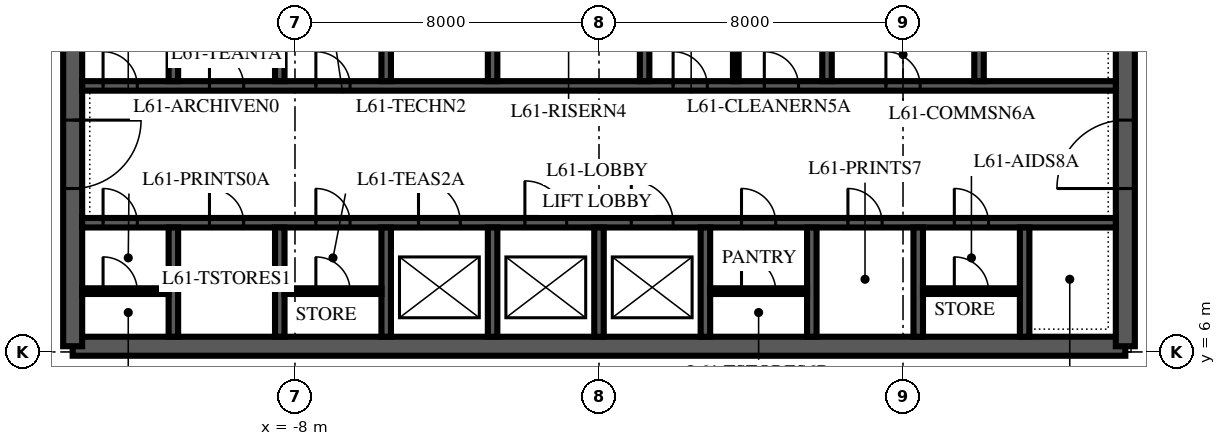
"""IFC4 building model, lengths in metres.
Left out: names, types, materials, properties, quantities, classifications, styles, units other than length and angle.
Written with IfcOpenShell. Run it as: python <this file> out.ifc"""

import sys

from ifc_helpers import new_model, si_unit, direction, frame, frame_2d, origin, place, context, subcontext, project, spatial, polyline, rectangle, outline, extrude, element, fill, save


model = new_model("IFC4")
c1 = context("Model", 3, precision=1e-05, world=origin(), true_north=direction((0.0, 1.0)))
c2 = subcontext(c1, "Body", "Model", "MODEL_VIEW")
j1 = project(units=[si_unit("LENGTHUNIT", "METRE"), si_unit("PLANEANGLEUNIT", "RADIAN")], contexts=[c1])
p1 = place(None, origin())
s1 = spatial("IfcSite", under=j1, at=p1, CompositionType="ELEMENT")
p2 = place(p1, origin())
s2 = spatial("IfcBuilding", under=s1, at=p2, CompositionType="ELEMENT")
p3 = place(p2, frame((0.0, 0.0, 264.0)))
s3 = spatial("IfcBuildingStorey", under=s2, at=p3, CompositionType="ELEMENT", Elevation=264.0)
p4 = place(p3, frame((-13.85, 6.15, 0.0), z_axis=(0.0, 0.0, 1.0), x_axis=(1.0, 0.0, 0.0)))
e1 = element("IfcWall", 1, at=p4, inside=s3, PredefinedType="SHEAR", context=c2, shape_type="SweptSolid", body=[
    extrude(rectangle(XDim=27.7, YDim=0.5, at=frame_2d((13.85, 0.0))), origin(), (0.0, 0.0, 1.0), 4.0),
])
p5 = place(p3, frame((13.85, 6.15, 0.0), z_axis=(0.0, 0.0, 1.0), x_axis=(0.0, 1.0, 0.0)))
e2 = element("IfcWall", 2, at=p5, inside=s3, PredefinedType="SHEAR", context=c2, shape_type="SweptSolid", body=[
    extrude(outline(polyline([(0.0, -0.25), (17.7, -0.25), (17.7, 0.0), (17.45, 0.0), (17.45, 0.25), (0.25, 0.25), (0.25, 0.0), (0.0, 0.0), (0.0, -0.25)])), origin(), (0.0, 0.0, 1.0), 4.0),
])
p6 = place(p5, frame((4.15, 0.0, 0.0)))
e3 = element("IfcOpeningElement", 3, at=p6, cuts=e2, PredefinedType="OPENING", context=c2, shape_type="SweptSolid", body=[
    extrude(rectangle(XDim=1.8, YDim=2.4, at=frame_2d((0.9, 1.2))), frame((0.0, 0.265, 0.0), z_axis=(0.0, -1.0, 0.0), x_axis=(1.0, 0.0, 0.0)), (0.0, 0.0, 1.0), 0.53),
])
p7 = place(p3, frame((-13.85, 23.85, 0.0), z_axis=(0.0, 0.0, 1.0), x_axis=(0.0, -1.0, 0.0)))
e4 = element("IfcWall", 4, at=p7, inside=s3, PredefinedType="SHEAR", context=c2, shape_type="SweptSolid", body=[
    extrude(outline(polyline([(0.0, -0.25), (17.7, -0.25), (17.7, 0.0), (17.45, 0.0), (17.45, 0.25), (0.25, 0.25), (0.25, 0.0), (0.0, 0.0), (0.0, -0.25)])), origin(), (0.0, 0.0, 1.0), 4.0),
])
p8 = place(p7, frame((11.75, 0.0, 0.0)))
e5 = element("IfcOpeningElement", 5, at=p8, cuts=e4, PredefinedType="OPENING", context=c2, shape_type="SweptSolid", body=[
    extrude(rectangle(XDim=1.8, YDim=2.4, at=frame_2d((0.9, 1.2))), frame((0.0, 0.265, 0.0), z_axis=(0.0, -1.0, 0.0), x_axis=(1.0, 0.0, 0.0)), (0.0, 0.0, 1.0), 0.53),
])
p9 = place(p3, frame((-13.6, 9.4, 0.0), z_axis=(0.0, 0.0, 1.0), x_axis=(1.0, 0.0, 0.0)))
e6 = element("IfcWall", 6, at=p9, inside=s3, PredefinedType="SHEAR", context=c2, shape_type="SweptSolid", body=[
    extrude(rectangle(XDim=27.2, YDim=0.25, at=frame_2d((13.6, 0.0))), origin(), (0.0, 0.0, 1.0), 4.0),
])
p10 = place(p9, frame((8.85, 0.0, 0.0)))
e7 = element("IfcOpeningElement", 7, at=p10, cuts=e6, PredefinedType="OPENING", context=c2, shape_type="SweptSolid", body=[
    extrude(rectangle(XDim=1.1, YDim=2.1, at=frame_2d((0.55, 1.05))), frame((0.0, 0.14, 0.0), z_axis=(0.0, -1.0, 0.0), x_axis=(1.0, 0.0, 0.0)), (0.0, 0.0, 1.0), 0.28),
])
p11 = place(p9, frame((11.65, 0.0, 0.0)))
e8 = element("IfcOpeningElement", 8, at=p11, cuts=e6, PredefinedType="OPENING", context=c2, shape_type="SweptSolid", body=[
    extrude(rectangle(XDim=1.1, YDim=2.1, at=frame_2d((0.55, 1.05))), frame((0.0, 0.14, 0.0), z_axis=(0.0, -1.0, 0.0), x_axis=(1.0, 0.0, 0.0)), (0.0, 0.0, 1.0), 0.28),
])
p12 = place(p9, frame((14.45, 0.0, 0.0)))
e9 = element("IfcOpeningElement", 9, at=p12, cuts=e6, PredefinedType="OPENING", context=c2, shape_type="SweptSolid", body=[
    extrude(rectangle(XDim=1.1, YDim=2.1, at=frame_2d((0.55, 1.05))), frame((0.0, 0.14, 0.0), z_axis=(0.0, -1.0, 0.0), x_axis=(1.0, 0.0, 0.0)), (0.0, 0.0, 1.0), 0.28),
])
p13 = place(p9, frame((0.55, 0.0, 0.0)))
e10 = element("IfcOpeningElement", 10, at=p13, cuts=e6, PredefinedType="OPENING", context=c2, shape_type="SweptSolid", body=[
    extrude(rectangle(XDim=0.9, YDim=2.1, at=frame_2d((0.45, 1.05))), frame((0.0, 0.14, 0.0), z_axis=(0.0, -1.0, 0.0), x_axis=(1.0, 0.0, 0.0)), (0.0, 0.0, 1.0), 0.28),
])
p14 = place(p9, frame((3.35, 0.0, 0.0)))
e11 = element("IfcOpeningElement", 11, at=p14, cuts=e6, PredefinedType="OPENING", context=c2, shape_type="SweptSolid", body=[
    extrude(rectangle(XDim=0.9, YDim=2.1, at=frame_2d((0.45, 1.05))), frame((0.0, 0.14, 0.0), z_axis=(0.0, -1.0, 0.0), x_axis=(1.0, 0.0, 0.0)), (0.0, 0.0, 1.0), 0.28),
])
p15 = place(p9, frame((6.15, 0.0, 0.0)))
e12 = element("IfcOpeningElement", 12, at=p15, cuts=e6, PredefinedType="OPENING", context=c2, shape_type="SweptSolid", body=[
    extrude(rectangle(XDim=0.9, YDim=2.1, at=frame_2d((0.45, 1.05))), frame((0.0, 0.14, 0.0), z_axis=(0.0, -1.0, 0.0), x_axis=(1.0, 0.0, 0.0)), (0.0, 0.0, 1.0), 0.28),
])
p16 = place(p9, frame((17.35, 0.0, 0.0)))
e13 = element("IfcOpeningElement", 13, at=p16, cuts=e6, PredefinedType="OPENING", context=c2, shape_type="SweptSolid", body=[
    extrude(rectangle(XDim=0.9, YDim=2.1, at=frame_2d((0.45, 1.05))), frame((0.0, 0.14, 0.0), z_axis=(0.0, -1.0, 0.0), x_axis=(1.0, 0.0, 0.0)), (0.0, 0.0, 1.0), 0.28),
])
p17 = place(p9, frame((20.15, 0.0, 0.0)))
e14 = element("IfcOpeningElement", 14, at=p17, cuts=e6, PredefinedType="OPENING", context=c2, shape_type="SweptSolid", body=[
    extrude(rectangle(XDim=0.9, YDim=2.1, at=frame_2d((0.45, 1.05))), frame((0.0, 0.14, 0.0), z_axis=(0.0, -1.0, 0.0), x_axis=(1.0, 0.0, 0.0)), (0.0, 0.0, 1.0), 0.28),
])
p18 = place(p9, frame((22.95, 0.0, 0.0)))
e15 = element("IfcOpeningElement", 15, at=p18, cuts=e6, PredefinedType="OPENING", context=c2, shape_type="SweptSolid", body=[
    extrude(rectangle(XDim=0.9, YDim=2.1, at=frame_2d((0.45, 1.05))), frame((0.0, 0.14, 0.0), z_axis=(0.0, -1.0, 0.0), x_axis=(1.0, 0.0, 0.0)), (0.0, 0.0, 1.0), 0.28),
])
p19 = place(p3, frame((-13.6, 13.0, 0.0), z_axis=(0.0, 0.0, 1.0), x_axis=(1.0, 0.0, 0.0)))
e16 = element("IfcWall", 16, at=p19, inside=s3, PredefinedType="SHEAR", context=c2, shape_type="SweptSolid", body=[
    extrude(rectangle(XDim=27.2, YDim=0.25, at=frame_2d((13.6, 0.0))), origin(), (0.0, 0.0, 1.0), 4.0),
])
p20 = place(p19, frame((15.55, 0.0, 0.0)))
e17 = element("IfcOpeningElement", 17, at=p20, cuts=e16, PredefinedType="OPENING", context=c2, shape_type="SweptSolid", body=[
    extrude(rectangle(XDim=0.9, YDim=2.1, at=frame_2d((0.45, 1.05))), frame((0.0, 0.14, 0.0), z_axis=(0.0, -1.0, 0.0), x_axis=(1.0, 0.0, 0.0)), (0.0, 0.0, 1.0), 0.28),
])
p21 = place(p19, frame((17.95, 0.0, 0.0)))
e18 = element("IfcOpeningElement", 18, at=p21, cuts=e16, PredefinedType="OPENING", context=c2, shape_type="SweptSolid", body=[
    extrude(rectangle(XDim=0.9, YDim=2.1, at=frame_2d((0.45, 1.05))), frame((0.0, 0.14, 0.0), z_axis=(0.0, -1.0, 0.0), x_axis=(1.0, 0.0, 0.0)), (0.0, 0.0, 1.0), 0.28),
])
p22 = place(p19, frame((21.15, 0.0, 0.0)))
e19 = element("IfcOpeningElement", 19, at=p22, cuts=e16, PredefinedType="OPENING", context=c2, shape_type="SweptSolid", body=[
    extrude(rectangle(XDim=0.9, YDim=2.1, at=frame_2d((0.45, 1.05))), frame((0.0, 0.14, 0.0), z_axis=(0.0, -1.0, 0.0), x_axis=(1.0, 0.0, 0.0)), (0.0, 0.0, 1.0), 0.28),
])
p23 = place(p19, frame((0.55, 0.0, 0.0)))
e20 = element("IfcOpeningElement", 20, at=p23, cuts=e16, PredefinedType="OPENING", context=c2, shape_type="SweptSolid", body=[
    extrude(rectangle(XDim=0.9, YDim=2.1, at=frame_2d((0.45, 1.05))), frame((0.0, 0.14, 0.0), z_axis=(0.0, -1.0, 0.0), x_axis=(1.0, 0.0, 0.0)), (0.0, 0.0, 1.0), 0.28),
])
p24 = place(p19, frame((3.35, 0.0, 0.0)))
e21 = element("IfcOpeningElement", 21, at=p24, cuts=e16, PredefinedType="OPENING", context=c2, shape_type="SweptSolid", body=[
    extrude(rectangle(XDim=0.9, YDim=2.1, at=frame_2d((0.45, 1.05))), frame((0.0, 0.14, 0.0), z_axis=(0.0, -1.0, 0.0), x_axis=(1.0, 0.0, 0.0)), (0.0, 0.0, 1.0), 0.28),
])
p25 = place(p19, frame((6.15, 0.0, 0.0)))
e22 = element("IfcOpeningElement", 22, at=p25, cuts=e16, PredefinedType="OPENING", context=c2, shape_type="SweptSolid", body=[
    extrude(rectangle(XDim=0.9, YDim=2.1, at=frame_2d((0.45, 1.05))), frame((0.0, 0.14, 0.0), z_axis=(0.0, -1.0, 0.0), x_axis=(1.0, 0.0, 0.0)), (0.0, 0.0, 1.0), 0.28),
])
for number, where, z_axis, x_axis in (
    (23, (-11.2, 6.4, 0.0), (0.0, 0.0, 1.0), (0.0, 1.0, 0.0)),
    (24, (-8.4, 6.4, 0.0), (0.0, 0.0, 1.0), (0.0, 1.0, 0.0)),
    (25, (-5.6, 6.4, 0.0), (0.0, 0.0, 1.0), (0.0, 1.0, 0.0)),
    (26, (-2.8, 6.4, 0.0), (0.0, 0.0, 1.0), (0.0, 1.0, 0.0)),
    (27, (0.0, 6.4, 0.0), (0.0, 0.0, 1.0), (0.0, 1.0, 0.0)),
    (28, (2.8, 6.4, 0.0), (0.0, 0.0, 1.0), (0.0, 1.0, 0.0)),
    (29, (5.6, 6.4, 0.0), (0.0, 0.0, 1.0), (0.0, 1.0, 0.0)),
    (30, (8.4, 6.4, 0.0), (0.0, 0.0, 1.0), (0.0, 1.0, 0.0)),
    (31, (11.2, 6.4, 0.0), (0.0, 0.0, 1.0), (0.0, 1.0, 0.0)),
):
    element("IfcWall", number, at=place(p3, frame(where, z_axis=z_axis, x_axis=x_axis)), inside=s3, PredefinedType="SHEAR", context=c2, shape_type="SweptSolid", body=[
        extrude(rectangle(XDim=2.875, YDim=0.25, at=frame_2d((1.438, 0.0))), origin(), (0.0, 0.0, 1.0), 4.0),
    ])
for number, where, z_axis, x_axis in (
    (32, (-11.2, 13.125, 0.0), (0.0, 0.0, 1.0), (0.0, 1.0, 0.0)),
    (33, (-8.4, 13.125, 0.0), (0.0, 0.0, 1.0), (0.0, 1.0, 0.0)),
    (34, (-5.6, 13.125, 0.0), (0.0, 0.0, 1.0), (0.0, 1.0, 0.0)),
    (35, (-2.8, 13.125, 0.0), (0.0, 0.0, 1.0), (0.0, 1.0, 0.0)),
    (36, (1.2, 13.125, 0.0), (0.0, 0.0, 1.0), (0.0, 1.0, 0.0)),
    (37, (6.0, 13.125, 0.0), (0.0, 0.0, 1.0), (0.0, 1.0, 0.0)),
    (38, (10.0, 13.125, 0.0), (0.0, 0.0, 1.0), (0.0, 1.0, 0.0)),
):
    element("IfcWall", number, at=place(p3, frame(where, z_axis=z_axis, x_axis=x_axis)), inside=s3, PredefinedType="SHEAR", context=c2, shape_type="SweptSolid", body=[
        extrude(rectangle(XDim=2.75, YDim=0.25, at=frame_2d((1.375, 0.0))), origin(), (0.0, 0.0, 1.0), 4.0),
    ])
p26 = place(p3, frame((3.6, 13.125, 0.0), z_axis=(0.0, 0.0, 1.0), x_axis=(0.0, 1.0, 0.0)))
e39 = element("IfcWall", 39, at=p26, inside=s3, PredefinedType="PARTITIONING", context=c2, shape_type="SweptSolid", body=[
    extrude(rectangle(XDim=2.75, YDim=0.15, at=frame_2d((1.375, 0.0))), origin(), (0.0, 0.0, 1.0), 3.85),
])
p27 = place(p3, frame((-13.6, 7.6, 0.0), z_axis=(0.0, 0.0, 1.0), x_axis=(1.0, 0.0, 0.0)))
e40 = element("IfcWall", 40, at=p27, inside=s3, PredefinedType="PARTITIONING", context=c2, shape_type="SweptSolid", body=[
    extrude(rectangle(XDim=2.275, YDim=0.15, at=frame_2d((1.138, 0.0))), origin(), (0.0, 0.0, 1.0), 3.85),
])
p28 = place(p27, frame((0.55, 0.0, 0.0)))
e41 = element("IfcOpeningElement", 41, at=p28, cuts=e40, PredefinedType="OPENING", context=c2, shape_type="SweptSolid", body=[
    extrude(rectangle(XDim=0.9, YDim=2.1, at=frame_2d((0.45, 1.05))), frame((0.0, 0.09, 0.0), z_axis=(0.0, -1.0, 0.0), x_axis=(1.0, 0.0, 0.0)), (0.0, 0.0, 1.0), 0.18),
])
p29 = place(p3, frame((-8.275, 7.6, 0.0), z_axis=(0.0, 0.0, 1.0), x_axis=(1.0, 0.0, 0.0)))
e42 = element("IfcWall", 42, at=p29, inside=s3, PredefinedType="PARTITIONING", context=c2, shape_type="SweptSolid", body=[
    extrude(rectangle(XDim=2.55, YDim=0.15, at=frame_2d((1.275, 0.0))), origin(), (0.0, 0.0, 1.0), 3.85),
])
p30 = place(p29, frame((0.825, 0.0, 0.0)))
e43 = element("IfcOpeningElement", 43, at=p30, cuts=e42, PredefinedType="OPENING", context=c2, shape_type="SweptSolid", body=[
    extrude(rectangle(XDim=0.9, YDim=2.1, at=frame_2d((0.45, 1.05))), frame((0.0, 0.09, 0.0), z_axis=(0.0, -1.0, 0.0), x_axis=(1.0, 0.0, 0.0)), (0.0, 0.0, 1.0), 0.18),
])
p31 = place(p3, frame((2.925, 7.6, 0.0), z_axis=(0.0, 0.0, 1.0), x_axis=(1.0, 0.0, 0.0)))
e44 = element("IfcWall", 44, at=p31, inside=s3, PredefinedType="PARTITIONING", context=c2, shape_type="SweptSolid", body=[
    extrude(rectangle(XDim=2.55, YDim=0.15, at=frame_2d((1.275, 0.0))), origin(), (0.0, 0.0, 1.0), 3.85),
])
p32 = place(p31, frame((0.825, 0.0, 0.0)))
e45 = element("IfcOpeningElement", 45, at=p32, cuts=e44, PredefinedType="OPENING", context=c2, shape_type="SweptSolid", body=[
    extrude(rectangle(XDim=0.9, YDim=2.1, at=frame_2d((0.45, 1.05))), frame((0.0, 0.09, 0.0), z_axis=(0.0, -1.0, 0.0), x_axis=(1.0, 0.0, 0.0)), (0.0, 0.0, 1.0), 0.18),
])
p33 = place(p3, frame((8.525, 7.6, 0.0), z_axis=(0.0, 0.0, 1.0), x_axis=(1.0, 0.0, 0.0)))
e46 = element("IfcWall", 46, at=p33, inside=s3, PredefinedType="PARTITIONING", context=c2, shape_type="SweptSolid", body=[
    extrude(rectangle(XDim=2.55, YDim=0.15, at=frame_2d((1.275, 0.0))), origin(), (0.0, 0.0, 1.0), 3.85),
])
p34 = place(p33, frame((0.825, 0.0, 0.0)))
e47 = element("IfcOpeningElement", 47, at=p34, cuts=e46, PredefinedType="OPENING", context=c2, shape_type="SweptSolid", body=[
    extrude(rectangle(XDim=0.9, YDim=2.1, at=frame_2d((0.45, 1.05))), frame((0.0, 0.09, 0.0), z_axis=(0.0, -1.0, 0.0), x_axis=(1.0, 0.0, 0.0)), (0.0, 0.0, 1.0), 0.18),
])
p35 = place(p6, origin())
e48 = element("IfcDoor", 48, at=p35, inside=s3, OperationType="DOUBLE_DOOR_SINGLE_SWING", PredefinedType="DOOR", context=c2, shape_type="SweptSolid", body=[
    extrude(rectangle(XDim=1.8, YDim=2.4, at=frame_2d((0.9, 1.2))), frame((0.0, 0.25, 0.0), z_axis=(0.0, -1.0, 0.0), x_axis=(1.0, 0.0, 0.0)), (0.0, 0.0, 1.0), 0.5),
])
fill(e3, e48)
p36 = place(p8, origin())
e49 = element("IfcDoor", 49, at=p36, inside=s3, OperationType="DOUBLE_DOOR_SINGLE_SWING", PredefinedType="DOOR", context=c2, shape_type="SweptSolid", body=[
    extrude(rectangle(XDim=1.8, YDim=2.4, at=frame_2d((0.9, 1.2))), frame((0.0, 0.25, 0.0), z_axis=(0.0, -1.0, 0.0), x_axis=(1.0, 0.0, 0.0)), (0.0, 0.0, 1.0), 0.5),
])
fill(e5, e49)
p37 = place(p10, origin())
e50 = element("IfcDoor", 50, at=p37, inside=s3, OperationType="SLIDING_TO_LEFT", PredefinedType="DOOR", context=c2, shape_type="SweptSolid", body=[
    extrude(rectangle(XDim=1.1, YDim=2.1, at=frame_2d((0.55, 1.05))), frame((0.0, 0.125, 0.0), z_axis=(0.0, -1.0, 0.0), x_axis=(1.0, 0.0, 0.0)), (0.0, 0.0, 1.0), 0.25),
])
fill(e7, e50)
p38 = place(p11, origin())
e51 = element("IfcDoor", 51, at=p38, inside=s3, OperationType="SLIDING_TO_LEFT", PredefinedType="DOOR", context=c2, shape_type="SweptSolid", body=[
    extrude(rectangle(XDim=1.1, YDim=2.1, at=frame_2d((0.55, 1.05))), frame((0.0, 0.125, 0.0), z_axis=(0.0, -1.0, 0.0), x_axis=(1.0, 0.0, 0.0)), (0.0, 0.0, 1.0), 0.25),
])
fill(e8, e51)
p39 = place(p12, origin())
e52 = element("IfcDoor", 52, at=p39, inside=s3, OperationType="SLIDING_TO_LEFT", PredefinedType="DOOR", context=c2, shape_type="SweptSolid", body=[
    extrude(rectangle(XDim=1.1, YDim=2.1, at=frame_2d((0.55, 1.05))), frame((0.0, 0.125, 0.0), z_axis=(0.0, -1.0, 0.0), x_axis=(1.0, 0.0, 0.0)), (0.0, 0.0, 1.0), 0.25),
])
fill(e9, e52)
p40 = place(p20, origin())
e53 = element("IfcDoor", 53, at=p40, inside=s3, OperationType="SINGLE_SWING_LEFT", PredefinedType="DOOR", context=c2, shape_type="SweptSolid", body=[
    extrude(rectangle(XDim=0.9, YDim=2.1, at=frame_2d((0.45, 1.05))), frame((0.0, 0.125, 0.0), z_axis=(0.0, -1.0, 0.0), x_axis=(1.0, 0.0, 0.0)), (0.0, 0.0, 1.0), 0.25),
])
fill(e17, e53)
p41 = place(p21, origin())
e54 = element("IfcDoor", 54, at=p41, inside=s3, OperationType="SINGLE_SWING_LEFT", PredefinedType="DOOR", context=c2, shape_type="SweptSolid", body=[
    extrude(rectangle(XDim=0.9, YDim=2.1, at=frame_2d((0.45, 1.05))), frame((0.0, 0.125, 0.0), z_axis=(0.0, -1.0, 0.0), x_axis=(1.0, 0.0, 0.0)), (0.0, 0.0, 1.0), 0.25),
])
fill(e18, e54)
p42 = place(p22, origin())
e55 = element("IfcDoor", 55, at=p42, inside=s3, OperationType="SINGLE_SWING_LEFT", PredefinedType="DOOR", context=c2, shape_type="SweptSolid", body=[
    extrude(rectangle(XDim=0.9, YDim=2.1, at=frame_2d((0.45, 1.05))), frame((0.0, 0.125, 0.0), z_axis=(0.0, -1.0, 0.0), x_axis=(1.0, 0.0, 0.0)), (0.0, 0.0, 1.0), 0.25),
])
fill(e19, e55)
p43 = place(p23, origin())
e56 = element("IfcDoor", 56, at=p43, inside=s3, OperationType="SINGLE_SWING_LEFT", PredefinedType="DOOR", context=c2, shape_type="SweptSolid", body=[
    extrude(rectangle(XDim=0.9, YDim=2.1, at=frame_2d((0.45, 1.05))), frame((0.0, 0.125, 0.0), z_axis=(0.0, -1.0, 0.0), x_axis=(1.0, 0.0, 0.0)), (0.0, 0.0, 1.0), 0.25),
])
fill(e20, e56)
p44 = place(p24, origin())
e57 = element("IfcDoor", 57, at=p44, inside=s3, OperationType="SINGLE_SWING_LEFT", PredefinedType="DOOR", context=c2, shape_type="SweptSolid", body=[
    extrude(rectangle(XDim=0.9, YDim=2.1, at=frame_2d((0.45, 1.05))), frame((0.0, 0.125, 0.0), z_axis=(0.0, -1.0, 0.0), x_axis=(1.0, 0.0, 0.0)), (0.0, 0.0, 1.0), 0.25),
])
fill(e21, e57)
p45 = place(p25, origin())
e58 = element("IfcDoor", 58, at=p45, inside=s3, OperationType="SINGLE_SWING_LEFT", PredefinedType="DOOR", context=c2, shape_type="SweptSolid", body=[
    extrude(rectangle(XDim=0.9, YDim=2.1, at=frame_2d((0.45, 1.05))), frame((0.0, 0.125, 0.0), z_axis=(0.0, -1.0, 0.0), x_axis=(1.0, 0.0, 0.0)), (0.0, 0.0, 1.0), 0.25),
])
fill(e22, e58)
p46 = place(p13, origin())
e59 = element("IfcDoor", 59, at=p46, inside=s3, OperationType="SINGLE_SWING_LEFT", PredefinedType="DOOR", context=c2, shape_type="SweptSolid", body=[
    extrude(rectangle(XDim=0.9, YDim=2.1, at=frame_2d((0.45, 1.05))), frame((0.0, 0.125, 0.0), z_axis=(0.0, -1.0, 0.0), x_axis=(1.0, 0.0, 0.0)), (0.0, 0.0, 1.0), 0.25),
])
fill(e10, e59)
p47 = place(p28, origin())
e60 = element("IfcDoor", 60, at=p47, inside=s3, OperationType="SINGLE_SWING_LEFT", PredefinedType="DOOR", context=c2, shape_type="SweptSolid", body=[
    extrude(rectangle(XDim=0.9, YDim=2.1, at=frame_2d((0.45, 1.05))), frame((0.0, 0.075, 0.0), z_axis=(0.0, -1.0, 0.0), x_axis=(1.0, 0.0, 0.0)), (0.0, 0.0, 1.0), 0.149),
])
fill(e41, e60)
p48 = place(p14, origin())
e61 = element("IfcDoor", 61, at=p48, inside=s3, OperationType="SINGLE_SWING_LEFT", PredefinedType="DOOR", context=c2, shape_type="SweptSolid", body=[
    extrude(rectangle(XDim=0.9, YDim=2.1, at=frame_2d((0.45, 1.05))), frame((0.0, 0.125, 0.0), z_axis=(0.0, -1.0, 0.0), x_axis=(1.0, 0.0, 0.0)), (0.0, 0.0, 1.0), 0.25),
])
fill(e11, e61)
p49 = place(p15, origin())
e62 = element("IfcDoor", 62, at=p49, inside=s3, OperationType="SINGLE_SWING_LEFT", PredefinedType="DOOR", context=c2, shape_type="SweptSolid", body=[
    extrude(rectangle(XDim=0.9, YDim=2.1, at=frame_2d((0.45, 1.05))), frame((0.0, 0.125, 0.0), z_axis=(0.0, -1.0, 0.0), x_axis=(1.0, 0.0, 0.0)), (0.0, 0.0, 1.0), 0.25),
])
fill(e12, e62)
p50 = place(p30, origin())
e63 = element("IfcDoor", 63, at=p50, inside=s3, OperationType="SINGLE_SWING_LEFT", PredefinedType="DOOR", context=c2, shape_type="SweptSolid", body=[
    extrude(rectangle(XDim=0.9, YDim=2.1, at=frame_2d((0.45, 1.05))), frame((0.0, 0.075, 0.0), z_axis=(0.0, -1.0, 0.0), x_axis=(1.0, 0.0, 0.0)), (0.0, 0.0, 1.0), 0.149),
])
fill(e43, e63)
p51 = place(p16, origin())
e64 = element("IfcDoor", 64, at=p51, inside=s3, OperationType="SINGLE_SWING_LEFT", PredefinedType="DOOR", context=c2, shape_type="SweptSolid", body=[
    extrude(rectangle(XDim=0.9, YDim=2.1, at=frame_2d((0.45, 1.05))), frame((0.0, 0.125, 0.0), z_axis=(0.0, -1.0, 0.0), x_axis=(1.0, 0.0, 0.0)), (0.0, 0.0, 1.0), 0.25),
])
fill(e13, e64)
p52 = place(p32, origin())
e65 = element("IfcDoor", 65, at=p52, inside=s3, OperationType="SINGLE_SWING_LEFT", PredefinedType="DOOR", context=c2, shape_type="SweptSolid", body=[
    extrude(rectangle(XDim=0.9, YDim=2.1, at=frame_2d((0.45, 1.05))), frame((0.0, 0.075, 0.0), z_axis=(0.0, -1.0, 0.0), x_axis=(1.0, 0.0, 0.0)), (0.0, 0.0, 1.0), 0.149),
])
fill(e45, e65)
p53 = place(p17, origin())
e66 = element("IfcDoor", 66, at=p53, inside=s3, OperationType="SINGLE_SWING_LEFT", PredefinedType="DOOR", context=c2, shape_type="SweptSolid", body=[
    extrude(rectangle(XDim=0.9, YDim=2.1, at=frame_2d((0.45, 1.05))), frame((0.0, 0.125, 0.0), z_axis=(0.0, -1.0, 0.0), x_axis=(1.0, 0.0, 0.0)), (0.0, 0.0, 1.0), 0.25),
])
fill(e14, e66)
p54 = place(p18, origin())
e67 = element("IfcDoor", 67, at=p54, inside=s3, OperationType="SINGLE_SWING_LEFT", PredefinedType="DOOR", context=c2, shape_type="SweptSolid", body=[
    extrude(rectangle(XDim=0.9, YDim=2.1, at=frame_2d((0.45, 1.05))), frame((0.0, 0.125, 0.0), z_axis=(0.0, -1.0, 0.0), x_axis=(1.0, 0.0, 0.0)), (0.0, 0.0, 1.0), 0.25),
])
fill(e15, e67)
p55 = place(p34, origin())
e68 = element("IfcDoor", 68, at=p55, inside=s3, OperationType="SINGLE_SWING_LEFT", PredefinedType="DOOR", context=c2, shape_type="SweptSolid", body=[
    extrude(rectangle(XDim=0.9, YDim=2.1, at=frame_2d((0.45, 1.05))), frame((0.0, 0.075, 0.0), z_axis=(0.0, -1.0, 0.0), x_axis=(1.0, 0.0, 0.0)), (0.0, 0.0, 1.0), 0.149),
])
fill(e47, e68)
save(model, sys.argv[1])
